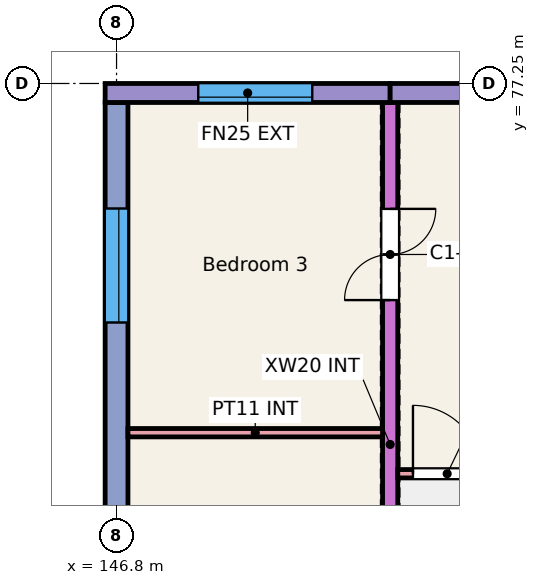
"""IFC4 building model, lengths in metres.
Left out: names, types, materials, properties, quantities, classifications, styles, units other than length and angle.
Written with IfcOpenShell. Run it as: python <this file> out.ifc"""

import sys

from ifc_helpers import new_model, si_unit, direction, frame, frame_2d, origin, place, context, subcontext, project, spatial, rectangle, extrude, element, fill, save


model = new_model("IFC4")
c1 = context("Model", 3, precision=1e-05, world=origin(), true_north=direction((0.0, 1.0)))
c2 = subcontext(c1, "Body", "Model", "MODEL_VIEW")
j1 = project(units=[si_unit("LENGTHUNIT", "METRE"), si_unit("PLANEANGLEUNIT", "RADIAN")], contexts=[c1])
p1 = place(None, origin())
s1 = spatial("IfcSite", under=j1, at=p1, CompositionType="ELEMENT")
p2 = place(p1, origin())
s2 = spatial("IfcBuilding", under=s1, at=p2, CompositionType="ELEMENT")
p3 = place(p2, frame((0.0, 0.0, 3.0)))
s3 = spatial("IfcBuildingStorey", under=s2, at=p3, CompositionType="ELEMENT", Elevation=3.0)
p4 = place(p3, frame((146.8, 66.0, 0.0), z_axis=(0.0, 0.0, 1.0), x_axis=(0.0, 1.0, 0.0)))
e1 = element("IfcWall", 1, at=p4, inside=s3, PredefinedType="SHEAR", context=c2, shape_type="SweptSolid", body=[
    extrude(rectangle(XDim=11.0, YDim=0.3, at=frame_2d((5.5, 0.0))), origin(), (0.0, 0.0, 1.0), 3.0),
])
p5 = place(p4, frame((3.55, 0.0, 0.9)))
e2 = element("IfcOpeningElement", 2, at=p5, cuts=e1, PredefinedType="OPENING", context=c2, shape_type="SweptSolid", body=[
    extrude(rectangle(XDim=1.5, YDim=1.5, at=frame_2d((0.75, 0.75))), frame((0.0, 0.16, 0.0), z_axis=(0.0, -1.0, 0.0), x_axis=(1.0, 0.0, 0.0)), (0.0, 0.0, 1.0), 0.32),
])
p6 = place(p4, frame((8.105, 0.0, 0.9)))
e3 = element("IfcOpeningElement", 3, at=p6, cuts=e1, PredefinedType="OPENING", context=c2, shape_type="SweptSolid", body=[
    extrude(rectangle(XDim=1.5, YDim=1.5, at=frame_2d((0.75, 0.75))), frame((0.0, 0.16, 0.0), z_axis=(0.0, -1.0, 0.0), x_axis=(1.0, 0.0, 0.0)), (0.0, 0.0, 1.0), 0.32),
])
p7 = place(p3, frame((150.4, 68.0, 0.0), z_axis=(0.0, 0.0, 1.0), x_axis=(0.0, 1.0, 0.0)))
e4 = element("IfcWall", 4, at=p7, inside=s3, PredefinedType="SHEAR", context=c2, shape_type="SweptSolid", body=[
    extrude(rectangle(XDim=9.0, YDim=0.2, at=frame_2d((4.5, 0.0))), origin(), (0.0, 0.0, 1.0), 3.0),
])
p8 = place(p7, frame((0.175, 0.0, 0.0)))
e5 = element("IfcOpeningElement", 5, at=p8, cuts=e4, PredefinedType="OPENING", context=c2, shape_type="SweptSolid", body=[
    extrude(rectangle(XDim=1.2, YDim=2.1, at=frame_2d((0.6, 1.05))), frame((0.0, 0.11, 0.0), z_axis=(0.0, -1.0, 0.0), x_axis=(1.0, 0.0, 0.0)), (0.0, 0.0, 1.0), 0.22),
])
p9 = place(p7, frame((6.4, 0.0, 0.0)))
e6 = element("IfcOpeningElement", 6, at=p9, cuts=e4, PredefinedType="OPENING", context=c2, shape_type="SweptSolid", body=[
    extrude(rectangle(XDim=1.2, YDim=2.1, at=frame_2d((0.6, 1.05))), frame((0.0, 0.11, 0.0), z_axis=(0.0, -1.0, 0.0), x_axis=(1.0, 0.0, 0.0)), (0.0, 0.0, 1.0), 0.22),
])
p10 = place(p3, frame((146.65, 77.125, 0.0), z_axis=(0.0, 0.0, 1.0), x_axis=(1.0, 0.0, 0.0)))
e7 = element("IfcWall", 7, at=p10, inside=s3, PredefinedType="SOLIDWALL", context=c2, shape_type="SweptSolid", body=[
    extrude(rectangle(XDim=3.75, YDim=0.25, at=frame_2d((1.875, 0.0))), origin(), (0.0, 0.0, 1.0), 3.0),
])
p11 = place(p10, frame((1.225, 0.0, 0.9)))
e8 = element("IfcOpeningElement", 8, at=p11, cuts=e7, PredefinedType="OPENING", context=c2, shape_type="SweptSolid", body=[
    extrude(rectangle(XDim=1.5, YDim=1.5, at=frame_2d((0.75, 0.75))), frame((0.0, 0.135, 0.0), z_axis=(0.0, -1.0, 0.0), x_axis=(1.0, 0.0, 0.0)), (0.0, 0.0, 1.0), 0.27),
])
p12 = place(p3, frame((150.4, 77.125, 0.0), z_axis=(0.0, 0.0, 1.0), x_axis=(1.0, 0.0, 0.0)))
e9 = element("IfcWall", 9, at=p12, inside=s3, PredefinedType="SOLIDWALL", context=c2, shape_type="SweptSolid", body=[
    extrude(rectangle(XDim=3.6, YDim=0.25, at=frame_2d((1.8, 0.0))), origin(), (0.0, 0.0, 1.0), 3.0),
])
p13 = place(p12, frame((1.038, 0.0, 0.9)))
e10 = element("IfcOpeningElement", 10, at=p13, cuts=e9, PredefinedType="OPENING", context=c2, shape_type="SweptSolid", body=[
    extrude(rectangle(XDim=1.5, YDim=1.5, at=frame_2d((0.75, 0.75))), frame((0.0, 0.135, 0.0), z_axis=(0.0, -1.0, 0.0), x_axis=(1.0, 0.0, 0.0)), (0.0, 0.0, 1.0), 0.27),
])
p14 = place(p3, frame((150.5, 72.115, 0.0), z_axis=(0.0, 0.0, 1.0), x_axis=(1.0, 0.0, 0.0)))
e11 = element("IfcWall", 11, at=p14, inside=s3, PredefinedType="PARTITIONING", context=c2, shape_type="SweptSolid", body=[
    extrude(rectangle(XDim=3.375, YDim=0.11, at=frame_2d((1.688, 0.0))), origin(), (0.0, 0.0, 1.0), 2.8),
])
p15 = place(p14, frame((0.2, 0.0, 0.0)))
e12 = element("IfcOpeningElement", 12, at=p15, cuts=e11, PredefinedType="OPENING", context=c2, shape_type="SweptSolid", body=[
    extrude(rectangle(XDim=0.9, YDim=2.1, at=frame_2d((0.45, 1.05))), frame((0.0, 0.065, 0.0), z_axis=(0.0, -1.0, 0.0), x_axis=(1.0, 0.0, 0.0)), (0.0, 0.0, 1.0), 0.13),
])
p16 = place(p3, frame((146.95, 72.655, 0.0), z_axis=(0.0, 0.0, 1.0), x_axis=(1.0, 0.0, 0.0)))
e13 = element("IfcWall", 13, at=p16, inside=s3, PredefinedType="PARTITIONING", context=c2, shape_type="SweptSolid", body=[
    extrude(rectangle(XDim=3.35, YDim=0.11, at=frame_2d((1.675, 0.0))), origin(), (0.0, 0.0, 1.0), 2.8),
])
p17 = place(p11, origin())
e14 = element("IfcWindow", 14, at=p17, inside=s3, PartitioningType="SINGLE_PANEL", PredefinedType="WINDOW", context=c2, shape_type="SweptSolid", body=[
    extrude(rectangle(XDim=1.5, YDim=1.5, at=frame_2d((0.75, 0.75))), frame((0.0, -0.025, 0.0), z_axis=(0.0, -1.0, 0.0), x_axis=(1.0, 0.0, 0.0)), (0.0, 0.0, 1.0), 0.06),
])
fill(e8, e14)
p18 = place(p6, origin())
e15 = element("IfcWindow", 15, at=p18, inside=s3, PartitioningType="SINGLE_PANEL", PredefinedType="WINDOW", context=c2, shape_type="SweptSolid", body=[
    extrude(rectangle(XDim=1.5, YDim=1.5, at=frame_2d((0.75, 0.75))), frame((0.0, 0.0, 0.0), z_axis=(0.0, -1.0, 0.0), x_axis=(1.0, 0.0, 0.0)), (0.0, 0.0, 1.0), 0.06),
])
fill(e3, e15)
p19 = place(p15, origin())
e16 = element("IfcDoor", 16, at=p19, inside=s3, OperationType="SINGLE_SWING_LEFT", PredefinedType="DOOR", context=c2, shape_type="SweptSolid", body=[
    extrude(rectangle(XDim=0.9, YDim=2.1, at=frame_2d((0.45, 1.05))), frame((0.0, 0.025, 0.0), z_axis=(0.0, -1.0, 0.0), x_axis=(1.0, 0.0, 0.0)), (0.0, 0.0, 1.0), 0.05),
])
fill(e12, e16)
p20 = place(p9, origin())
e17 = element("IfcDoor", 17, at=p20, inside=s3, OperationType="DOUBLE_DOOR_SINGLE_SWING", PredefinedType="DOOR", context=c2, shape_type="SweptSolid", body=[
    extrude(rectangle(XDim=1.2, YDim=2.1, at=frame_2d((0.6, 1.05))), frame((0.0, 0.025, 0.0), z_axis=(0.0, -1.0, 0.0), x_axis=(1.0, 0.0, 0.0)), (0.0, 0.0, 1.0), 0.05),
])
fill(e6, e17)
save(model, sys.argv[1])
